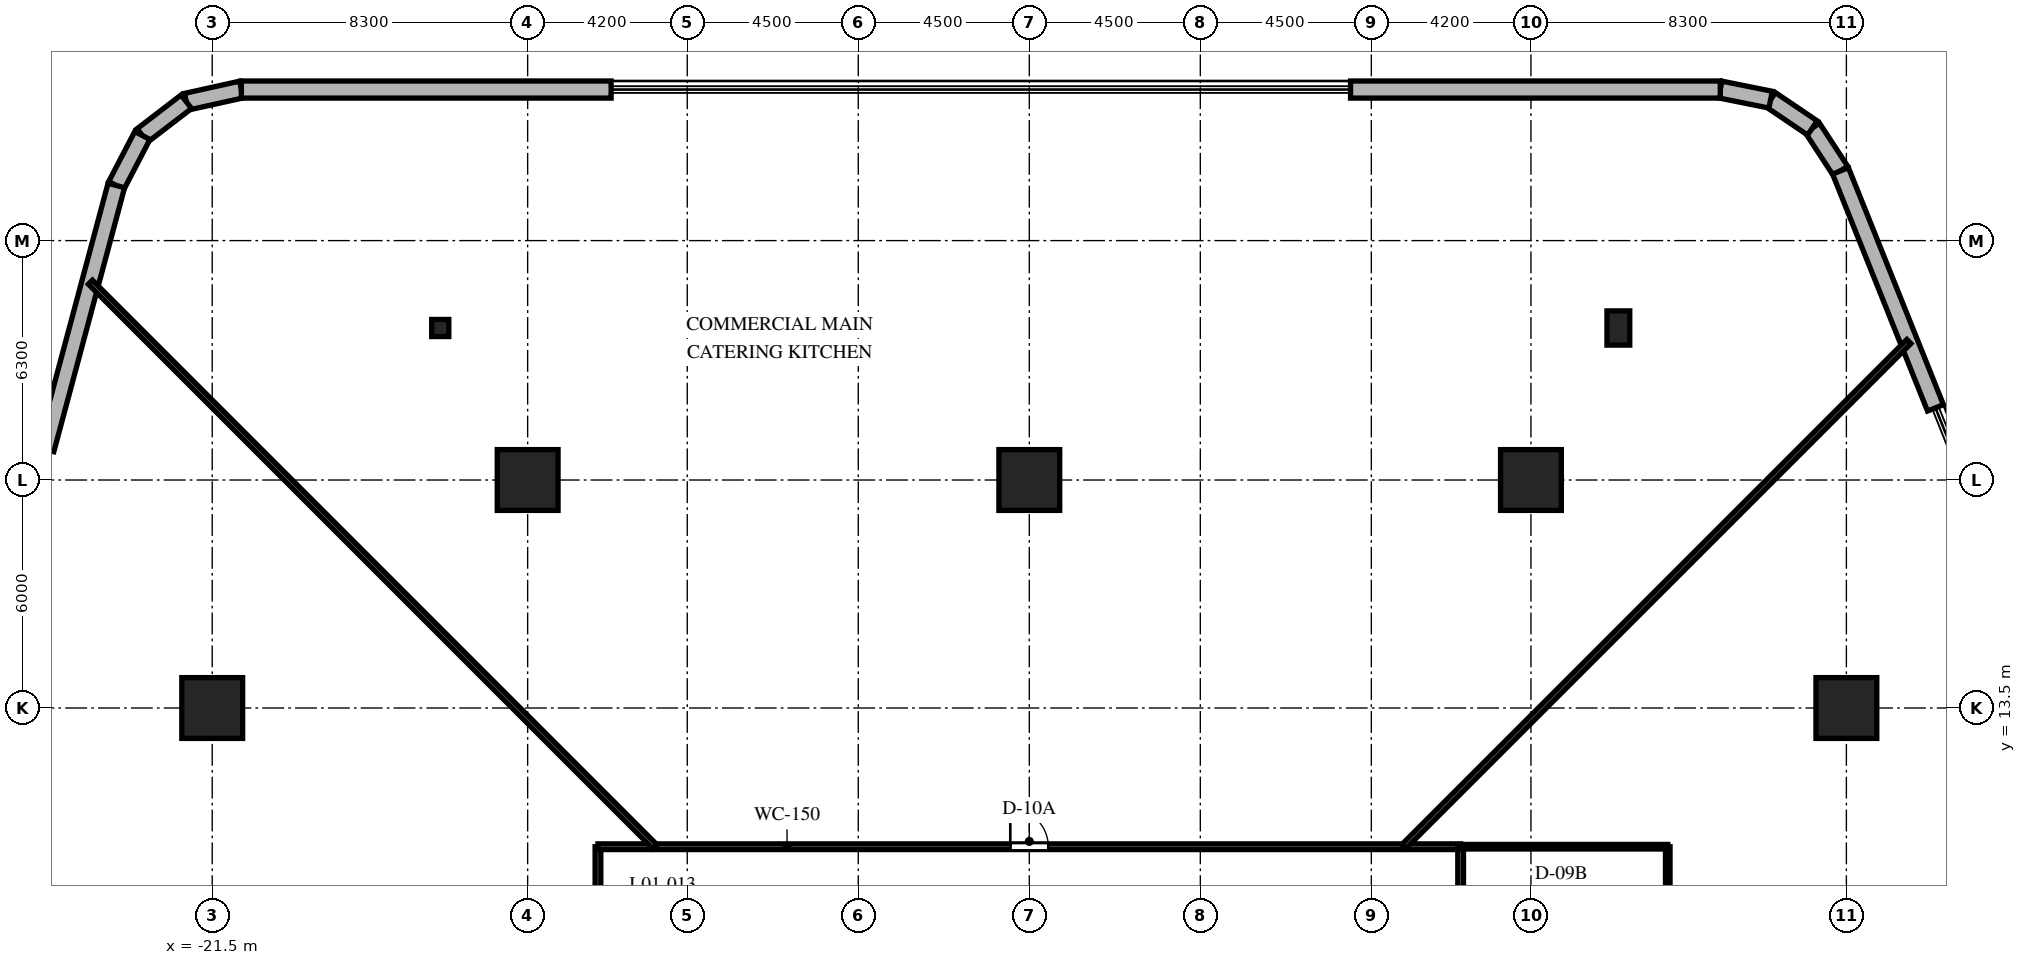
"""IFC4 building model, lengths in metres.
Left out: names, types, materials, properties, quantities, classifications, styles, units other than length and angle.
Written with IfcOpenShell. Run it as: python <this file> out.ifc"""

import sys

from ifc_helpers import new_model, si_unit, direction, frame, frame_2d, origin, origin_2d, place, context, subcontext, project, spatial, rectangle, extrude, element, fill, save


model = new_model("IFC4")
c1 = context("Model", 3, precision=1e-05, world=origin(), true_north=direction((0.0, 1.0)))
c2 = subcontext(c1, "Body", "Model", "MODEL_VIEW")
j1 = project(units=[si_unit("LENGTHUNIT", "METRE"), si_unit("PLANEANGLEUNIT", "RADIAN")], contexts=[c1])
p1 = place(None, origin())
s1 = spatial("IfcSite", under=j1, at=p1, CompositionType="ELEMENT")
p2 = place(p1, origin())
s2 = spatial("IfcBuilding", under=s1, at=p2, CompositionType="ELEMENT")
p3 = place(p2, frame((0.0, 0.0, 6.0)))
s3 = spatial("IfcBuildingStorey", under=s2, at=p3, CompositionType="ELEMENT", Elevation=6.0)
for number, where, z_axis, x_axis in (
    (1, (-21.5, 13.5, 0.0), (0.0, 0.0, 1.0), (1.0, 0.0, 0.0)),
    (2, (21.5, 13.5, 0.0), (0.0, 0.0, 1.0), (1.0, 0.0, 0.0)),
    (3, (-13.2, 19.5, 0.0), (0.0, 0.0, 1.0), (1.0, 0.0, 0.0)),
    (4, (0.0, 19.5, 0.0), (0.0, 0.0, 1.0), (1.0, 0.0, 0.0)),
    (5, (13.2, 19.5, 0.0), (0.0, 0.0, 1.0), (1.0, 0.0, 0.0)),
):
    element("IfcColumn", number, at=place(p3, frame(where, z_axis=z_axis, x_axis=x_axis)), inside=s3, PredefinedType="COLUMN", context=c2, shape_type="SweptSolid", body=[
        extrude(rectangle(XDim=1.6, YDim=1.6, at=origin_2d()), origin(), (0.0, 0.0, 1.0), 5.4),
    ])
p4 = place(p3, frame((15.5, 23.5, 0.0), z_axis=(0.0, 0.0, 1.0), x_axis=(1.0, 0.0, 0.0)))
e6 = element("IfcColumn", 6, at=p4, inside=s3, PredefinedType="PILASTER", context=c2, shape_type="SweptSolid", body=[
    extrude(rectangle(XDim=0.6, YDim=0.9, at=origin_2d()), origin(), (0.0, 0.0, 1.0), 5.4),
])
p5 = place(p3, frame((-15.5, 23.5, 0.0), z_axis=(0.0, 0.0, 1.0), x_axis=(1.0, 0.0, 0.0)))
e7 = element("IfcColumn", 7, at=p5, inside=s3, PredefinedType="PILASTER", context=c2, shape_type="SweptSolid", body=[
    extrude(rectangle(XDim=0.45, YDim=0.45, at=origin_2d()), origin(), (0.0, 0.0, 1.0), 5.4),
])
p6 = place(p3, frame((21.345, 27.635, 0.0), z_axis=(0.0, 0.0, 1.0), x_axis=(-0.547463611757, 0.836829489085, 0.0)))
e8 = element("IfcWall", 8, at=p6, inside=s3, PredefinedType="SOLIDWALL", context=c2, shape_type="SweptSolid", body=[
    extrude(rectangle(XDim=1.351, YDim=0.45, at=frame_2d((0.675, 0.0))), origin(), (0.0, 0.0, 1.0), 4.05),
])
p7 = place(p3, frame((20.606, 28.765, 0.0), z_axis=(0.0, 0.0, 1.0), x_axis=(-0.82832607687, 0.560246294389, 0.0)))
e9 = element("IfcWall", 9, at=p7, inside=s3, PredefinedType="SOLIDWALL", context=c2, shape_type="SweptSolid", body=[
    extrude(rectangle(XDim=1.328, YDim=0.45, at=frame_2d((0.664, 0.0))), origin(), (0.0, 0.0, 1.0), 4.05),
])
p8 = place(p3, frame((19.506, 29.509, 0.0), z_axis=(0.0, 0.0, 1.0), x_axis=(-0.98039950709, 0.19701981245, 0.0)))
e10 = element("IfcWall", 10, at=p8, inside=s3, PredefinedType="SOLIDWALL", context=c2, shape_type="SweptSolid", body=[
    extrude(rectangle(XDim=1.351, YDim=0.45, at=frame_2d((0.675, 0.0))), origin(), (0.0, 0.0, 1.0), 4.05),
])
p9 = place(p3, frame((-20.733, 29.775, 0.0), z_axis=(0.0, 0.0, 1.0), x_axis=(-0.976314642779, -0.21635553678, 0.0)))
e11 = element("IfcWall", 11, at=p9, inside=s3, PredefinedType="SOLIDWALL", context=c2, shape_type="SweptSolid", body=[
    extrude(rectangle(XDim=1.484, YDim=0.45, at=frame_2d((0.742, 0.0))), origin(), (0.0, 0.0, 1.0), 4.05),
])
p10 = place(p3, frame((-22.182, 29.454, 0.0), z_axis=(0.0, 0.0, 1.0), x_axis=(-0.793363842704, -0.608747741754, 0.0)))
e12 = element("IfcWall", 12, at=p10, inside=s3, PredefinedType="SOLIDWALL", context=c2, shape_type="SweptSolid", body=[
    extrude(rectangle(XDim=1.459, YDim=0.45, at=frame_2d((0.729, 0.0))), origin(), (0.0, 0.0, 1.0), 4.05),
])
p11 = place(p3, frame((-23.339, 28.566, 0.0), z_axis=(0.0, 0.0, 1.0), x_axis=(-0.461699810705, -0.887036236461, 0.0)))
e13 = element("IfcWall", 13, at=p11, inside=s3, PredefinedType="SOLIDWALL", context=c2, shape_type="SweptSolid", body=[
    extrude(rectangle(XDim=1.484, YDim=0.45, at=frame_2d((0.742, 0.0))), origin(), (0.0, 0.0, 1.0), 4.05),
])
p12 = place(p3, frame((23.844, 21.398, 0.0), z_axis=(0.0, 0.0, 1.0), x_axis=(-0.37196701808, 0.928245946644, 0.0)))
e14 = element("IfcWall", 14, at=p12, inside=s3, PredefinedType="SOLIDWALL", context=c2, shape_type="SweptSolid", body=[
    extrude(rectangle(XDim=6.719, YDim=0.45, at=frame_2d((3.359, 0.0))), origin(), (0.0, 0.0, 1.0), 4.05),
])
p13 = place(p3, frame((18.182, 29.775, 0.0), z_axis=(0.0, 0.0, 1.0), x_axis=(-1.0, 0.0, 0.0)))
e15 = element("IfcWall", 15, at=p13, inside=s3, PredefinedType="SOLIDWALL", context=c2, shape_type="SweptSolid", body=[
    extrude(rectangle(XDim=9.729, YDim=0.45, at=frame_2d((4.865, 0.0))), origin(), (0.0, 0.0, 1.0), 4.05),
])
p14 = place(p3, frame((-11.004, 29.775, 0.0), z_axis=(0.0, 0.0, 1.0), x_axis=(-1.0, 0.0, 0.0)))
e16 = element("IfcWall", 16, at=p14, inside=s3, PredefinedType="SOLIDWALL", context=c2, shape_type="SweptSolid", body=[
    extrude(rectangle(XDim=9.729, YDim=0.45, at=frame_2d((4.864, 0.0))), origin(), (0.0, 0.0, 1.0), 4.05),
])
p15 = place(p3, frame((-24.024, 27.25, 0.0), z_axis=(0.0, 0.0, 1.0), x_axis=(-0.25880339056, -0.965930020775, 0.0)))
e17 = element("IfcWall", 17, at=p15, inside=s3, PredefinedType="SOLIDWALL", context=c2, shape_type="SweptSolid", body=[
    extrude(rectangle(XDim=7.192, YDim=0.45, at=frame_2d((3.596, 0.0))), origin(), (0.0, 0.0, 1.0), 4.05),
])
p16 = place(p3, frame((-11.35, -9.85, 0.0), z_axis=(0.0, 0.0, 1.0), x_axis=(0.0, 1.0, 0.0)))
e18 = element("IfcWall", 18, at=p16, inside=s3, PredefinedType="PARTITIONING", context=c2, shape_type="SweptSolid", body=[
    extrude(rectangle(XDim=19.7, YDim=0.15, at=frame_2d((9.85, 0.0))), origin(), (0.0, 0.0, 1.0), 4.122),
])
p17 = place(p16, frame((9.35, 0.0, 0.0)))
e19 = element("IfcOpeningElement", 19, at=p17, cuts=e18, PredefinedType="OPENING", context=c2, shape_type="SweptSolid", body=[
    extrude(rectangle(XDim=1.0, YDim=2.03, at=frame_2d((0.5, 1.015))), frame((0.0, 0.085, 0.0), z_axis=(0.0, -1.0, 0.0), x_axis=(1.0, 0.0, 0.0)), (0.0, 0.0, 1.0), 0.17),
])
p18 = place(p3, frame((-11.35, 9.85, 0.0), z_axis=(0.0, 0.0, 1.0), x_axis=(1.0, 0.0, 0.0)))
e20 = element("IfcWall", 20, at=p18, inside=s3, PredefinedType="PARTITIONING", context=c2, shape_type="SweptSolid", body=[
    extrude(rectangle(XDim=22.7, YDim=0.15, at=frame_2d((11.35, 0.0))), origin(), (0.0, 0.0, 1.0), 4.122),
])
p19 = place(p18, frame((10.85, 0.0, 0.0)))
e21 = element("IfcOpeningElement", 21, at=p19, cuts=e20, PredefinedType="OPENING", context=c2, shape_type="SweptSolid", body=[
    extrude(rectangle(XDim=1.0, YDim=2.03, at=frame_2d((0.5, 1.015))), frame((0.0, 0.085, 0.0), z_axis=(0.0, -1.0, 0.0), x_axis=(1.0, 0.0, 0.0)), (0.0, 0.0, 1.0), 0.17),
])
p20 = place(p3, frame((11.35, 9.85, 0.0), z_axis=(0.0, 0.0, 1.0), x_axis=(0.0, -1.0, 0.0)))
e22 = element("IfcWall", 22, at=p20, inside=s3, PredefinedType="PARTITIONING", context=c2, shape_type="SweptSolid", body=[
    extrude(rectangle(XDim=19.7, YDim=0.15, at=frame_2d((9.85, 0.0))), origin(), (0.0, 0.0, 1.0), 4.122),
])
p21 = place(p20, frame((2.1, 0.0, 0.0)))
e23 = element("IfcOpeningElement", 23, at=p21, cuts=e22, PredefinedType="OPENING", context=c2, shape_type="SweptSolid", body=[
    extrude(rectangle(XDim=0.9, YDim=2.03, at=frame_2d((0.45, 1.015))), frame((0.0, 0.085, 0.0), z_axis=(0.0, -1.0, 0.0), x_axis=(1.0, 0.0, 0.0)), (0.0, 0.0, 1.0), 0.17),
])
p22 = place(p20, frame((15.628, 0.0, 0.0)))
e24 = element("IfcOpeningElement", 24, at=p22, cuts=e22, PredefinedType="OPENING", context=c2, shape_type="SweptSolid", body=[
    extrude(rectangle(XDim=1.8, YDim=2.2, at=frame_2d((0.9, 1.1))), frame((0.0, 0.085, 0.0), z_axis=(0.0, -1.0, 0.0), x_axis=(1.0, 0.0, 0.0)), (0.0, 0.0, 1.0), 0.17),
])
p23 = place(p3, frame((16.8, 6.45, 0.0), z_axis=(0.0, 0.0, 1.0), x_axis=(0.0, 1.0, 0.0)))
e25 = element("IfcWall", 25, at=p23, inside=s3, PredefinedType="PARTITIONING", context=c2, shape_type="SweptSolid", body=[
    extrude(rectangle(XDim=3.4, YDim=0.12, at=frame_2d((1.7, 0.0))), origin(), (0.0, 0.0, 1.0), 5.08),
])
p24 = place(p3, frame((11.35, 9.85, 0.0), z_axis=(0.0, 0.0, 1.0), x_axis=(1.0, 0.0, 0.0)))
e26 = element("IfcWall", 26, at=p24, inside=s3, PredefinedType="PARTITIONING", context=c2, shape_type="SweptSolid", body=[
    extrude(rectangle(XDim=5.45, YDim=0.12, at=frame_2d((2.725, 0.0))), origin(), (0.0, 0.0, 1.0), 4.214),
])
p25 = place(p3, frame((9.85, 9.85, 0.0), z_axis=(0.0, 0.0, 1.0), x_axis=(0.707106781187, 0.707106781187, 0.0)))
e27 = element("IfcWall", 27, at=p25, inside=s3, PredefinedType="PARTITIONING", context=c2, shape_type="SweptSolid", body=[
    extrude(rectangle(XDim=18.801, YDim=0.15, at=frame_2d((9.401, 0.0))), origin(), (0.0, 0.0, 1.0), 4.122),
])
p26 = place(p3, frame((-9.85, 9.85, 0.0), z_axis=(0.0, 0.0, 1.0), x_axis=(-0.707106781187, 0.707106781187, 0.0)))
e28 = element("IfcWall", 28, at=p26, inside=s3, PredefinedType="PARTITIONING", context=c2, shape_type="SweptSolid", body=[
    extrude(rectangle(XDim=21.009, YDim=0.15, at=frame_2d((10.504, 0.0))), origin(), (0.0, 0.0, 1.0), 4.07),
])
p27 = place(p19, origin())
e29 = element("IfcDoor", 29, at=p27, inside=s3, OperationType="SINGLE_SWING_LEFT", PredefinedType="DOOR", context=c2, shape_type="SweptSolid", body=[
    extrude(rectangle(XDim=1.0, YDim=2.03, at=frame_2d((0.5, 1.015))), frame((0.0, 0.025, 0.0), z_axis=(0.0, -1.0, 0.0), x_axis=(1.0, 0.0, 0.0)), (0.0, 0.0, 1.0), 0.05),
])
fill(e21, e29)
save(model, sys.argv[1])
